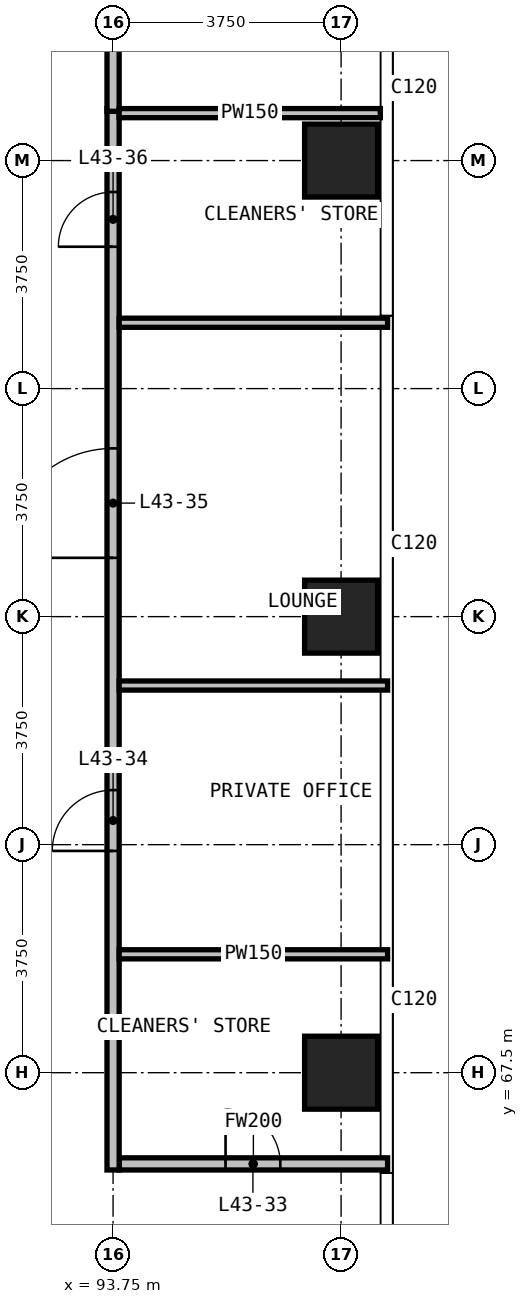
"""IFC4 building model, lengths in metres.
Left out: names, types, materials, properties, quantities, classifications, styles, units other than length and angle.
Written with IfcOpenShell. Run it as: python <this file> out.ifc"""

import sys

from ifc_helpers import new_model, si_unit, direction, frame, frame_2d, origin, origin_2d, place, context, subcontext, project, spatial, rectangle, extrude, element, fill, save


model = new_model("IFC4")
c1 = context("Model", 3, precision=1e-05, world=origin(), true_north=direction((0.0, 1.0)))
c2 = subcontext(c1, "Body", "Model", "MODEL_VIEW")
j1 = project(units=[si_unit("LENGTHUNIT", "METRE"), si_unit("PLANEANGLEUNIT", "RADIAN")], contexts=[c1])
p1 = place(None, origin())
s1 = spatial("IfcSite", under=j1, at=p1, CompositionType="ELEMENT")
p2 = place(p1, origin())
s2 = spatial("IfcBuilding", under=s1, at=p2, CompositionType="ELEMENT")
p3 = place(p2, frame((0.0, 0.0, 169.3)))
s3 = spatial("IfcBuildingStorey", under=s2, at=p3, CompositionType="ELEMENT", Elevation=169.3)
for number, where, z_axis, x_axis in (
    (1, (97.5, 67.5, 0.0), (0.0, 0.0, 1.0), (1.0, 0.0, 0.0)),
    (2, (97.5, 75.0, 0.0), (0.0, 0.0, 1.0), (1.0, 0.0, 0.0)),
    (3, (97.5, 82.5, 0.0), (0.0, 0.0, 1.0), (1.0, 0.0, 0.0)),
):
    element("IfcColumn", number, at=place(p3, frame(where, z_axis=z_axis, x_axis=x_axis)), inside=s3, PredefinedType="COLUMN", context=c2, shape_type="SweptSolid", body=[
        extrude(rectangle(XDim=1.2, YDim=1.2, at=origin_2d()), origin(), (0.0, 0.0, 1.0), 3.6),
    ])
p4 = place(p3, frame((93.85, 66.0, 0.0), z_axis=(0.0, 0.0, 1.0), x_axis=(1.0, 0.0, 0.0)))
e4 = element("IfcWall", 4, at=p4, inside=s3, PredefinedType="PARTITIONING", context=c2, shape_type="SweptSolid", body=[
    extrude(rectangle(XDim=4.415, YDim=0.2, at=frame_2d((2.208, 0.0))), origin(), (0.0, 0.0, 1.0), 3.3),
])
p5 = place(p4, frame((1.75, 0.0, 0.0)))
e5 = element("IfcOpeningElement", 5, at=p5, cuts=e4, PredefinedType="OPENING", context=c2, shape_type="SweptSolid", body=[
    extrude(rectangle(XDim=0.9, YDim=2.2, at=frame_2d((0.45, 1.1))), frame((0.0, 0.11, 0.0), z_axis=(0.0, -1.0, 0.0), x_axis=(1.0, 0.0, 0.0)), (0.0, 0.0, 1.0), 0.22),
])
p6 = place(p3, frame((93.75, 65.9, 0.0), z_axis=(0.0, 0.0, 1.0), x_axis=(0.0, 1.0, 0.0)))
e6 = element("IfcWall", 6, at=p6, inside=s3, PredefinedType="PARTITIONING", context=c2, shape_type="SweptSolid", body=[
    extrude(rectangle(XDim=17.455, YDim=0.2, at=frame_2d((8.728, 0.0))), origin(), (0.0, 0.0, 1.0), 3.3),
])
p7 = place(p6, frame((5.247, 0.0, 0.0)))
e7 = element("IfcOpeningElement", 7, at=p7, cuts=e6, PredefinedType="OPENING", context=c2, shape_type="SweptSolid", body=[
    extrude(rectangle(XDim=1.0, YDim=2.2, at=frame_2d((0.5, 1.1))), frame((0.0, 0.11, 0.0), z_axis=(0.0, -1.0, 0.0), x_axis=(1.0, 0.0, 0.0)), (0.0, 0.0, 1.0), 0.22),
])
p8 = place(p6, frame((10.067, 0.0, 0.0)))
e8 = element("IfcOpeningElement", 8, at=p8, cuts=e6, PredefinedType="OPENING", context=c2, shape_type="SweptSolid", body=[
    extrude(rectangle(XDim=1.8, YDim=2.2, at=frame_2d((0.9, 1.1))), frame((0.0, 0.11, 0.0), z_axis=(0.0, -1.0, 0.0), x_axis=(1.0, 0.0, 0.0)), (0.0, 0.0, 1.0), 0.22),
])
p9 = place(p6, frame((15.183, 0.0, 0.0)))
e9 = element("IfcOpeningElement", 9, at=p9, cuts=e6, PredefinedType="OPENING", context=c2, shape_type="SweptSolid", body=[
    extrude(rectangle(XDim=0.9, YDim=2.2, at=frame_2d((0.45, 1.1))), frame((0.0, 0.11, 0.0), z_axis=(0.0, -1.0, 0.0), x_axis=(1.0, 0.0, 0.0)), (0.0, 0.0, 1.0), 0.22),
])
p10 = place(p3, frame((93.75, 83.31, 0.0), z_axis=(0.0, 0.0, 1.0), x_axis=(0.0, 1.0, 0.0)))
e10 = element("IfcWall", 10, at=p10, inside=s3, PredefinedType="PARTITIONING", context=c2, shape_type="SweptSolid", body=[
    extrude(rectangle(XDim=7.335, YDim=0.2, at=frame_2d((3.667, 0.0))), origin(), (0.0, 0.0, 1.0), 3.3),
])
for number, where, z_axis, x_axis in (
    (11, (93.85, 69.447, 0.0), (0.0, 0.0, 1.0), (1.0, 0.0, 0.0)),
    (12, (93.85, 73.867, 0.0), (0.0, 0.0, 1.0), (1.0, 0.0, 0.0)),
    (13, (93.85, 79.833, 0.0), (0.0, 0.0, 1.0), (1.0, 0.0, 0.0)),
):
    element("IfcWall", number, at=place(p3, frame(where, z_axis=z_axis, x_axis=x_axis)), inside=s3, PredefinedType="PARTITIONING", context=c2, shape_type="SweptSolid", body=[
        extrude(rectangle(XDim=4.415, YDim=0.15, at=frame_2d((2.208, 0.0))), origin(), (0.0, 0.0, 1.0), 3.3),
    ])
p11 = place(p3, frame((93.85, 83.28, 0.0), z_axis=(0.0, 0.0, 1.0), x_axis=(1.0, 0.0, 0.0)))
e14 = element("IfcWall", 14, at=p11, inside=s3, PredefinedType="PARTITIONING", context=c2, shape_type="SweptSolid", body=[
    extrude(rectangle(XDim=4.295, YDim=0.15, at=frame_2d((2.147, 0.0))), origin(), (0.0, 0.0, 1.0), 3.3),
])
p12 = place(p5, origin())
e15 = element("IfcDoor", 15, at=p12, inside=s3, OperationType="SINGLE_SWING_RIGHT", PredefinedType="DOOR", context=c2, shape_type="SweptSolid", body=[
    extrude(rectangle(XDim=0.9, YDim=2.2, at=frame_2d((0.45, 1.1))), frame((0.0, 0.025, 0.0), z_axis=(0.0, -1.0, 0.0), x_axis=(1.0, 0.0, 0.0)), (0.0, 0.0, 1.0), 0.05),
])
fill(e5, e15)
p13 = place(p7, origin())
e16 = element("IfcDoor", 16, at=p13, inside=s3, OperationType="SINGLE_SWING_LEFT", PredefinedType="DOOR", context=c2, shape_type="SweptSolid", body=[
    extrude(rectangle(XDim=1.0, YDim=2.2, at=frame_2d((0.5, 1.1))), frame((0.0, 0.025, 0.0), z_axis=(0.0, -1.0, 0.0), x_axis=(1.0, 0.0, 0.0)), (0.0, 0.0, 1.0), 0.05),
])
fill(e7, e16)
p14 = place(p8, origin())
e17 = element("IfcDoor", 17, at=p14, inside=s3, OperationType="DOUBLE_DOOR_SINGLE_SWING", PredefinedType="DOOR", context=c2, shape_type="SweptSolid", body=[
    extrude(rectangle(XDim=1.8, YDim=2.2, at=frame_2d((0.9, 1.1))), frame((0.0, 0.025, 0.0), z_axis=(0.0, -1.0, 0.0), x_axis=(1.0, 0.0, 0.0)), (0.0, 0.0, 1.0), 0.05),
])
fill(e8, e17)
p15 = place(p9, origin())
e18 = element("IfcDoor", 18, at=p15, inside=s3, OperationType="SINGLE_SWING_LEFT", PredefinedType="DOOR", context=c2, shape_type="SweptSolid", body=[
    extrude(rectangle(XDim=0.9, YDim=2.2, at=frame_2d((0.45, 1.1))), frame((0.0, 0.025, 0.0), z_axis=(0.0, -1.0, 0.0), x_axis=(1.0, 0.0, 0.0)), (0.0, 0.0, 1.0), 0.05),
])
fill(e9, e18)
save(model, sys.argv[1])
